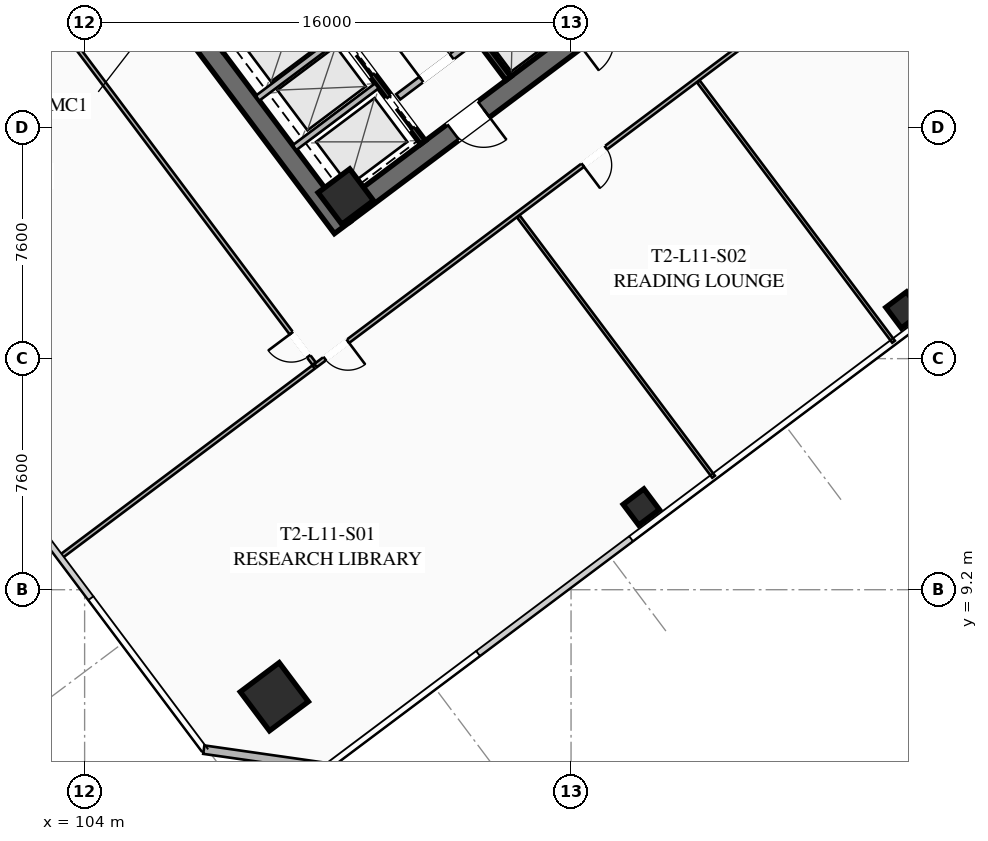
"""IFC4 building model, lengths in metres.
Left out: names, types, materials, properties, quantities, classifications, styles, units other than length and angle.
Written with IfcOpenShell. Run it as: python <this file> out.ifc"""

import sys

from ifc_helpers import new_model, si_unit, direction, frame, frame_2d, origin, origin_2d, place, context, subcontext, project, spatial, rectangle, hollow_rectangle, extrude, element, fill, save


model = new_model("IFC4")
c1 = context("Model", 3, precision=1e-05, world=origin(), true_north=direction((0.0, 1.0)))
c2 = subcontext(c1, "Body", "Model", "MODEL_VIEW")
j1 = project(units=[si_unit("LENGTHUNIT", "METRE"), si_unit("PLANEANGLEUNIT", "RADIAN")], contexts=[c1])
p1 = place(None, origin())
s1 = spatial("IfcSite", under=j1, at=p1, CompositionType="ELEMENT")
p2 = place(p1, origin())
s2 = spatial("IfcBuilding", under=s1, at=p2, CompositionType="ELEMENT")
p3 = place(p2, frame((0.0, 0.0, 45.9)))
s3 = spatial("IfcBuildingStorey", under=s2, at=p3, CompositionType="ELEMENT", Elevation=45.9)
p4 = place(p3, frame((112.476, 21.107, 0.0), z_axis=(0.0, 0.0, 1.0), x_axis=(-0.600005007985, 0.799996243986, 0.0)))
e1 = element("IfcWall", 1, at=p4, inside=s3, PredefinedType="SHEAR", context=c2, shape_type="SweptSolid", body=[
    extrude(rectangle(XDim=15.6, YDim=0.65, at=frame_2d((7.8, 0.0))), origin(), (0.0, 0.0, 1.0), 3.55),
])
p5 = place(p3, frame((124.429, 30.478, 0.0), z_axis=(0.0, 0.0, 1.0), x_axis=(-0.799998028465, -0.600002628705, 0.0)))
e2 = element("IfcWall", 2, at=p5, inside=s3, PredefinedType="SHEAR", context=c2, shape_type="SweptSolid", body=[
    extrude(rectangle(XDim=14.86, YDim=0.65, at=frame_2d((7.43, 0.0))), origin(), (0.0, 0.0, 1.0), 3.55),
])
p6 = place(p5, frame((9.13, 0.0, 0.0)))
e3 = element("IfcOpeningElement", 3, at=p6, cuts=e2, PredefinedType="OPENING", context=c2, shape_type="SweptSolid", body=[
    extrude(rectangle(XDim=1.25, YDim=2.25, at=frame_2d((0.625, 1.125))), frame((0.0, 0.335, 0.0), z_axis=(0.0, -1.0, 0.0), x_axis=(1.0, 0.0, 0.0)), (0.0, 0.0, 1.0), 0.67),
])
p7 = place(p5, frame((4.08, 0.0, 0.0)))
e4 = element("IfcOpeningElement", 4, at=p7, cuts=e2, PredefinedType="OPENING", context=c2, shape_type="SweptSolid", body=[
    extrude(rectangle(XDim=1.25, YDim=2.25, at=frame_2d((0.625, 1.125))), frame((0.0, 0.335, 0.0), z_axis=(0.0, -1.0, 0.0), x_axis=(1.0, 0.0, 0.0)), (0.0, 0.0, 1.0), 0.67),
])
p8 = place(p3, frame((112.59, 22.13, 0.0), z_axis=(0.0, 0.0, 1.0), x_axis=(0.799999996291, 0.600000004945, 0.0)))
e5 = element("IfcColumn", 5, at=p8, inside=s3, PredefinedType="COLUMN", context=c2, shape_type="SweptSolid", body=[
    extrude(hollow_rectangle(XDim=1.3, YDim=1.3, WallThickness=0.05, at=origin_2d()), origin(), (0.0, 0.0, 1.0), 3.35),
])
p9 = place(p3, frame((110.24, 5.68, 0.0), z_axis=(0.0, 0.0, 1.0), x_axis=(0.799999996291, 0.600000004945, 0.0)))
e6 = element("IfcColumn", 6, at=p9, inside=s3, PredefinedType="COLUMN", context=c2, shape_type="SweptSolid", body=[
    extrude(hollow_rectangle(XDim=1.6, YDim=1.6, WallThickness=0.06, at=origin_2d()), origin(), (0.0, 0.0, 1.0), 3.35),
])
for number, where, z_axis, x_axis in (
    (7, (122.31, 11.92, 0.0), (0.0, 0.0, 1.0), (0.8, 0.6, 0.0)),
    (8, (130.95, 18.4, 0.0), (0.0, 0.0, 1.0), (0.8, 0.6, 0.0)),
):
    element("IfcColumn", number, at=place(p3, frame(where, z_axis=z_axis, x_axis=x_axis)), inside=s3, PredefinedType="COLUMN", context=c2, shape_type="SweptSolid", body=[
        extrude(hollow_rectangle(XDim=0.85, YDim=0.85, WallThickness=0.035, at=origin_2d()), origin(), (0.0, 0.0, 1.0), 3.35),
    ])
p10 = place(p3, frame((111.98, 3.36, 0.0), z_axis=(0.0, 0.0, 1.0), x_axis=(-0.989955445613, 0.14137968631, 0.0)))
e9 = element("IfcWall", 9, at=p10, inside=s3, PredefinedType="SOLIDWALL", context=c2, shape_type="SweptSolid", body=[
    extrude(rectangle(XDim=4.101, YDim=0.28, at=frame_2d((2.051, 0.0))), origin(), (0.0, 0.0, 1.0), 3.35),
])
p11 = place(p3, frame((117.938, 26.016, 0.0), z_axis=(0.0, 0.0, 1.0), x_axis=(-0.600005463273, 0.799995902516, 0.0)))
e10 = element("IfcWall", 10, at=p11, inside=s3, PredefinedType="SHEAR", context=c2, shape_type="SweptSolid", body=[
    extrude(rectangle(XDim=14.3, YDim=0.2, at=frame_2d((7.15, 0.0))), origin(), (0.0, 0.0, 1.0), 3.35),
])
p12 = place(p3, frame((114.316, 25.412, 0.0), z_axis=(0.0, 0.0, 1.0), x_axis=(0.800018601094, 0.59997519774, 0.0)))
e11 = element("IfcWall", 11, at=p12, inside=s3, PredefinedType="SOLIDWALL", context=c2, shape_type="SweptSolid", body=[
    extrude(rectangle(XDim=3.15, YDim=0.22, at=frame_2d((1.575, 0.0))), origin(), (0.0, 0.0, 1.0), 2.703),
])
p13 = place(p12, frame((0.95, 0.0, 0.0)))
e12 = element("IfcOpeningElement", 12, at=p13, cuts=e11, PredefinedType="OPENING", context=c2, shape_type="SweptSolid", body=[
    extrude(rectangle(XDim=1.25, YDim=2.25, at=frame_2d((0.625, 1.125))), frame((0.0, 0.12, 0.0), z_axis=(0.0, -1.0, 0.0), x_axis=(1.0, 0.0, 0.0)), (0.0, 0.0, 1.0), 0.24),
])
p14 = place(p3, frame((115.13, 23.91, 0.0), z_axis=(0.0, 0.0, 1.0), x_axis=(-0.599975393228, 0.800018454488, 0.0)))
e13 = element("IfcWall", 13, at=p14, inside=s3, PredefinedType="SHEAR", context=c2, shape_type="SweptSolid", body=[
    extrude(rectangle(XDim=6.35, YDim=0.2, at=frame_2d((3.175, 0.0))), origin(), (0.0, 0.0, 1.0), 3.35),
])
p15 = place(p14, frame((4.775, 0.0, 0.0)))
e14 = element("IfcOpeningElement", 14, at=p15, cuts=e13, PredefinedType="OPENING", context=c2, shape_type="SweptSolid", body=[
    extrude(rectangle(XDim=1.3, YDim=2.25, at=frame_2d((0.65, 1.125))), frame((0.0, 0.11, 0.0), z_axis=(0.0, -1.0, 0.0), x_axis=(1.0, 0.0, 0.0)), (0.0, 0.0, 1.0), 0.22),
])
p16 = place(p14, frame((2.775, 0.0, 0.0)))
e15 = element("IfcOpeningElement", 15, at=p16, cuts=e13, PredefinedType="OPENING", context=c2, shape_type="SweptSolid", body=[
    extrude(rectangle(XDim=1.3, YDim=2.25, at=frame_2d((0.65, 1.125))), frame((0.0, 0.11, 0.0), z_axis=(0.0, -1.0, 0.0), x_axis=(1.0, 0.0, 0.0)), (0.0, 0.0, 1.0), 0.22),
])
p17 = place(p14, frame((0.575, 0.0, 0.0)))
e16 = element("IfcOpeningElement", 16, at=p17, cuts=e13, PredefinedType="OPENING", context=c2, shape_type="SweptSolid", body=[
    extrude(rectangle(XDim=1.3, YDim=2.25, at=frame_2d((0.65, 1.125))), frame((0.0, 0.11, 0.0), z_axis=(0.0, -1.0, 0.0), x_axis=(1.0, 0.0, 0.0)), (0.0, 0.0, 1.0), 0.22),
])
for number, where, z_axis, x_axis in (
    (17, (110.906, 23.742, 0.0), (0.0, 0.0, 1.0), (0.8, 0.6, 0.0)),
    (18, (109.688, 25.366, 0.0), (0.0, 0.0, 1.0), (0.8, 0.6, 0.0)),
):
    element("IfcWall", number, at=place(p3, frame(where, z_axis=z_axis, x_axis=x_axis)), inside=s3, PredefinedType="SOLIDWALL", context=c2, shape_type="SweptSolid", body=[
        extrude(rectangle(XDim=3.38, YDim=0.2, at=frame_2d((1.69, 0.0))), origin(), (0.0, 0.0, 1.0), 3.35),
    ])
p18 = place(p3, frame((135.46, 34.47, 0.0), z_axis=(0.0, 0.0, 1.0), x_axis=(-0.800000982127, -0.599998690494, 0.0)))
e19 = element("IfcWall", 19, at=p18, inside=s3, PredefinedType="PARTITIONING", context=c2, shape_type="SweptSolid", body=[
    extrude(rectangle(XDim=29.83, YDim=0.135, at=frame_2d((14.915, 0.0))), origin(), (0.0, 0.0, 1.0), 2.703),
])
p19 = place(p18, frame((28.5, 0.0, 0.0)))
e20 = element("IfcOpeningElement", 20, at=p19, cuts=e19, PredefinedType="OPENING", context=c2, shape_type="SweptSolid", body=[
    extrude(rectangle(XDim=0.95, YDim=2.05, at=frame_2d((0.475, 1.025))), frame((0.0, 0.077, 0.0), z_axis=(0.0, -1.0, 0.0), x_axis=(1.0, 0.0, 0.0)), (0.0, 0.0, 1.0), 0.155),
])
p20 = place(p18, frame((17.892, 0.0, 0.0)))
e21 = element("IfcOpeningElement", 21, at=p20, cuts=e19, PredefinedType="OPENING", context=c2, shape_type="SweptSolid", body=[
    extrude(rectangle(XDim=0.95, YDim=2.05, at=frame_2d((0.475, 1.025))), frame((0.0, 0.077, 0.0), z_axis=(0.0, -1.0, 0.0), x_axis=(1.0, 0.0, 0.0)), (0.0, 0.0, 1.0), 0.155),
])
p21 = place(p18, frame((0.38, 0.0, 0.0)))
e22 = element("IfcOpeningElement", 22, at=p21, cuts=e19, PredefinedType="OPENING", context=c2, shape_type="SweptSolid", body=[
    extrude(rectangle(XDim=0.95, YDim=2.05, at=frame_2d((0.475, 1.025))), frame((0.0, 0.077, 0.0), z_axis=(0.0, -1.0, 0.0), x_axis=(1.0, 0.0, 0.0)), (0.0, 0.0, 1.0), 0.155),
])
for number, where, z_axis, x_axis in (
    (23, (124.688, 12.916, 0.0), (0.0, 0.0, 1.0), (-0.6, 0.8, 0.0)),
    (24, (130.608, 17.356, 0.0), (0.0, 0.0, 1.0), (-0.6, 0.8, 0.0)),
):
    element("IfcWall", number, at=place(p3, frame(where, z_axis=z_axis, x_axis=x_axis)), inside=s3, PredefinedType="PARTITIONING", context=c2, shape_type="SweptSolid", body=[
        extrude(rectangle(XDim=10.7, YDim=0.11, at=frame_2d((5.35, 0.0))), origin(), (0.0, 0.0, 1.0), 2.703),
    ])
p22 = place(p3, frame((111.548, 16.636, 0.0), z_axis=(0.0, 0.0, 1.0), x_axis=(-0.600003610192, 0.799997292343, 0.0)))
e25 = element("IfcWall", 25, at=p22, inside=s3, PredefinedType="PARTITIONING", context=c2, shape_type="SweptSolid", body=[
    extrude(rectangle(XDim=21.64, YDim=0.135, at=frame_2d((10.82, 0.0))), origin(), (0.0, 0.0, 1.0), 2.703),
])
p23 = place(p22, frame((0.3, 0.0, 0.0)))
e26 = element("IfcOpeningElement", 26, at=p23, cuts=e25, PredefinedType="OPENING", context=c2, shape_type="SweptSolid", body=[
    extrude(rectangle(XDim=0.95, YDim=2.05, at=frame_2d((0.475, 1.025))), frame((0.0, 0.077, 0.0), z_axis=(0.0, -1.0, 0.0), x_axis=(1.0, 0.0, 0.0)), (0.0, 0.0, 1.0), 0.155),
])
p24 = place(p3, frame((103.196, 10.272, 0.0), z_axis=(0.0, 0.0, 1.0), x_axis=(0.8, 0.6, 0.0)))
e27 = element("IfcWall", 27, at=p24, inside=s3, PredefinedType="PARTITIONING", context=c2, shape_type="SweptSolid", body=[
    extrude(rectangle(XDim=10.42, YDim=0.135, at=frame_2d((5.21, 0.0))), origin(), (0.0, 0.0, 1.0), 2.703),
])
p25 = place(p6, origin())
e28 = element("IfcDoor", 28, at=p25, inside=s3, OperationType="SINGLE_SWING_LEFT", PredefinedType="DOOR", context=c2, shape_type="SweptSolid", body=[
    extrude(rectangle(XDim=1.25, YDim=2.25, at=frame_2d((0.625, 1.125))), frame((0.0, 0.025, 0.0), z_axis=(0.0, -1.0, 0.0), x_axis=(1.0, 0.0, 0.0)), (0.0, 0.0, 1.0), 0.05),
])
fill(e3, e28)
p26 = place(p13, origin())
e29 = element("IfcDoor", 29, at=p26, inside=s3, OperationType="SINGLE_SWING_LEFT", PredefinedType="DOOR", context=c2, shape_type="SweptSolid", body=[
    extrude(rectangle(XDim=1.25, YDim=2.25, at=frame_2d((0.625, 1.125))), frame((0.0, 0.025, 0.0), z_axis=(0.0, -1.0, 0.0), x_axis=(1.0, 0.0, 0.0)), (0.0, 0.0, 1.0), 0.05),
])
fill(e12, e29)
p27 = place(p19, origin())
e30 = element("IfcDoor", 30, at=p27, inside=s3, OperationType="SINGLE_SWING_LEFT", PredefinedType="DOOR", context=c2, shape_type="SweptSolid", body=[
    extrude(rectangle(XDim=0.95, YDim=2.05, at=frame_2d((0.475, 1.025))), frame((0.0, 0.025, 0.0), z_axis=(0.0, -1.0, 0.0), x_axis=(1.0, 0.0, 0.0)), (0.0, 0.0, 1.0), 0.05),
])
fill(e20, e30)
p28 = place(p20, origin())
e31 = element("IfcDoor", 31, at=p28, inside=s3, OperationType="SINGLE_SWING_RIGHT", PredefinedType="DOOR", context=c2, shape_type="SweptSolid", body=[
    extrude(rectangle(XDim=0.95, YDim=2.05, at=frame_2d((0.475, 1.025))), frame((0.0, 0.025, 0.0), z_axis=(0.0, -1.0, 0.0), x_axis=(1.0, 0.0, 0.0)), (0.0, 0.0, 1.0), 0.05),
])
fill(e21, e31)
p29 = place(p23, origin())
e32 = element("IfcDoor", 32, at=p29, inside=s3, OperationType="SINGLE_SWING_RIGHT", PredefinedType="DOOR", context=c2, shape_type="SweptSolid", body=[
    extrude(rectangle(XDim=0.95, YDim=2.05, at=frame_2d((0.475, 1.025))), frame((0.0, 0.025, 0.0), z_axis=(0.0, -1.0, 0.0), x_axis=(1.0, 0.0, 0.0)), (0.0, 0.0, 1.0), 0.05),
])
fill(e26, e32)
p30 = place(p16, origin())
e33 = element("IfcDoor", 33, at=p30, inside=s3, OperationType="SLIDING_TO_LEFT", PredefinedType="DOOR", context=c2, shape_type="SweptSolid", body=[
    extrude(rectangle(XDim=1.3, YDim=2.25, at=frame_2d((0.65, 1.125))), frame((0.0, 0.025, 0.0), z_axis=(0.0, -1.0, 0.0), x_axis=(1.0, 0.0, 0.0)), (0.0, 0.0, 1.0), 0.05),
])
fill(e15, e33)
p31 = place(p17, origin())
e34 = element("IfcDoor", 34, at=p31, inside=s3, OperationType="SLIDING_TO_LEFT", PredefinedType="DOOR", context=c2, shape_type="SweptSolid", body=[
    extrude(rectangle(XDim=1.3, YDim=2.25, at=frame_2d((0.65, 1.125))), frame((0.0, 0.025, 0.0), z_axis=(0.0, -1.0, 0.0), x_axis=(1.0, 0.0, 0.0)), (0.0, 0.0, 1.0), 0.05),
])
fill(e16, e34)
save(model, sys.argv[1])
